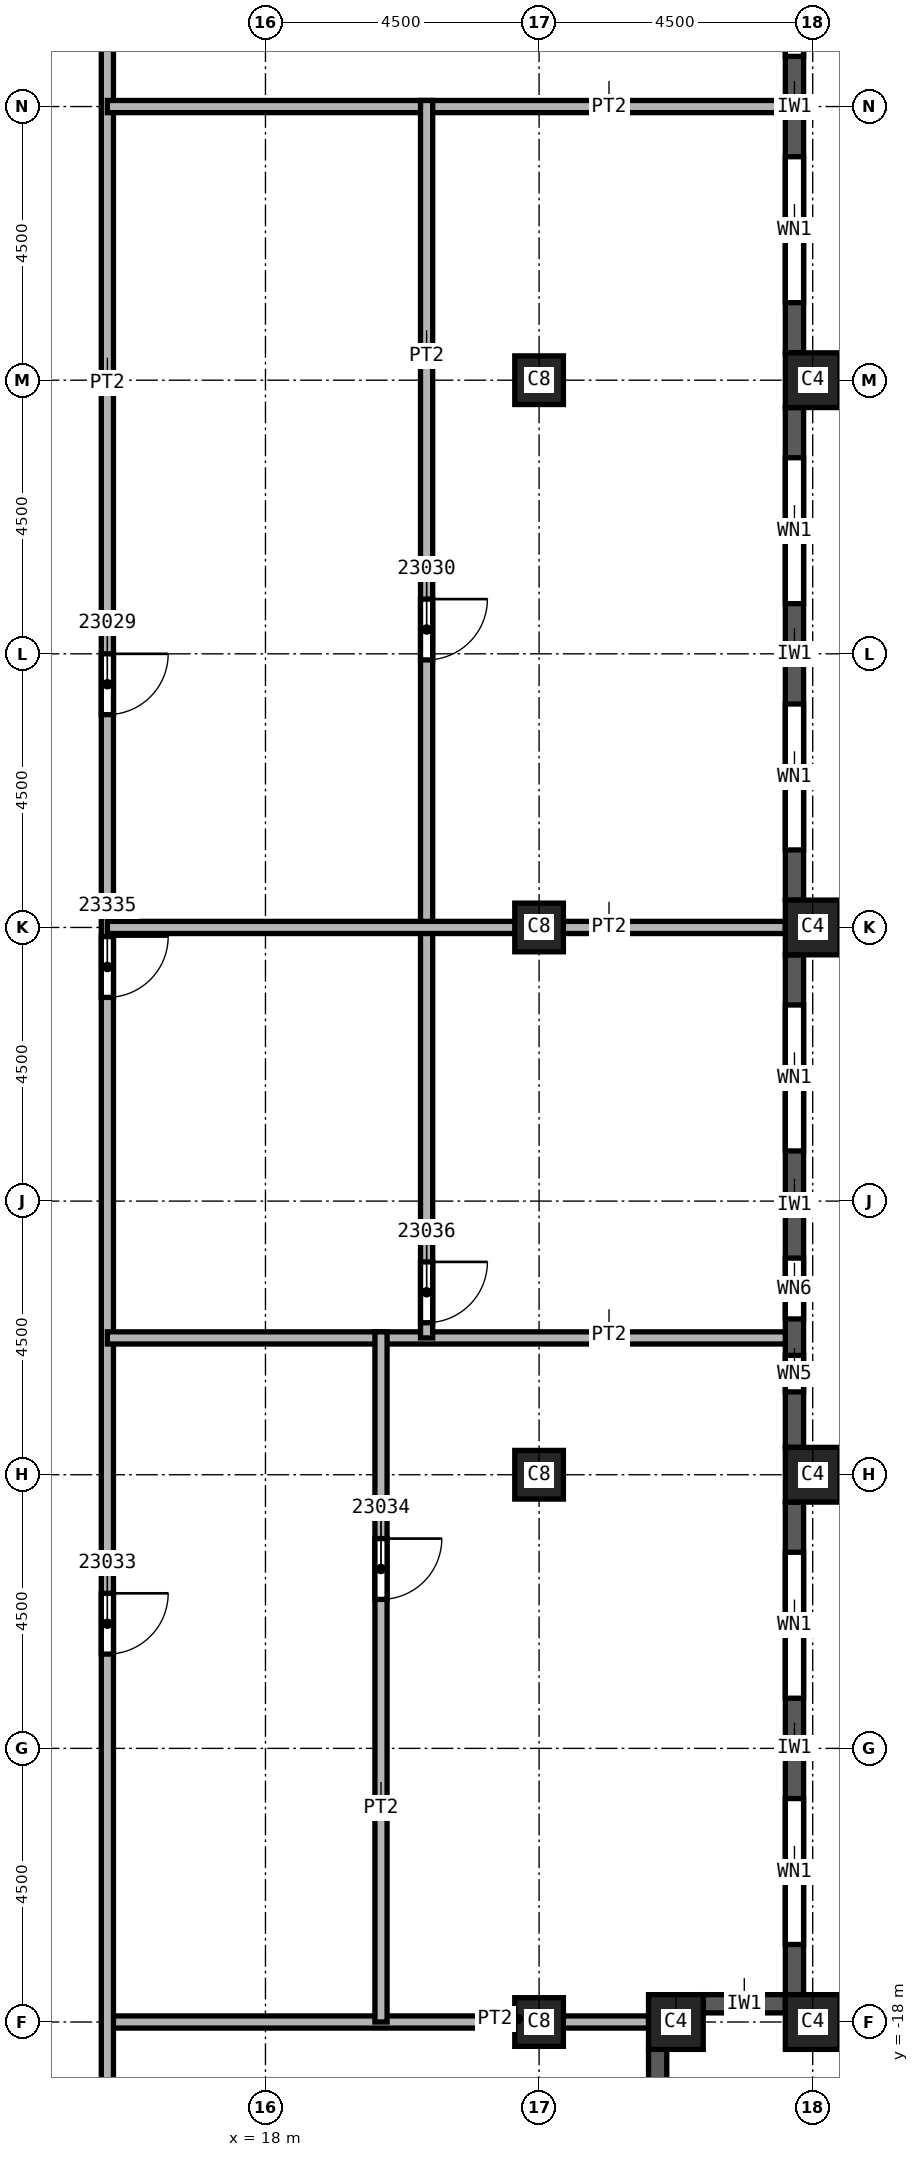
"""IFC4 building model, lengths in metres.
Left out: names, types, materials, properties, quantities, classifications, styles, units other than length and angle.
Written with IfcOpenShell. Run it as: python <this file> out.ifc"""

import sys

from ifc_helpers import new_model, si_unit, direction, frame, frame_2d, origin, origin_2d, place, context, subcontext, project, spatial, rectangle, extrude, element, fill, save


model = new_model("IFC4")
c1 = context("Model", 3, precision=1e-05, world=origin(), true_north=direction((0.0, 1.0)))
c2 = subcontext(c1, "Body", "Model", "MODEL_VIEW")
j1 = project(units=[si_unit("LENGTHUNIT", "METRE"), si_unit("PLANEANGLEUNIT", "RADIAN")], contexts=[c1])
p1 = place(None, origin())
s1 = spatial("IfcSite", under=j1, at=p1, CompositionType="ELEMENT")
p2 = place(p1, origin())
s2 = spatial("IfcBuilding", under=s1, at=p2, CompositionType="ELEMENT")
p3 = place(p2, frame((0.0, 0.0, 330.0)))
s3 = spatial("IfcBuildingStorey", under=s2, at=p3, CompositionType="ELEMENT", Elevation=330.0)
for number, where, z_axis, x_axis in (
    (1, (22.5, 0.0, 0.0), (0.0, 0.0, 1.0), (1.0, 0.0, 0.0)),
    (2, (22.5, 9.0, 0.0), (0.0, 0.0, 1.0), (1.0, 0.0, 0.0)),
    (3, (22.5, -9.0, 0.0), (0.0, 0.0, 1.0), (1.0, 0.0, 0.0)),
    (4, (22.5, -18.0, 0.0), (0.0, 0.0, 1.0), (1.0, 0.0, 0.0)),
):
    element("IfcColumn", number, at=place(p3, frame(where, z_axis=z_axis, x_axis=x_axis)), inside=s3, PredefinedType="COLUMN", context=c2, shape_type="SweptSolid", body=[
        extrude(rectangle(XDim=0.8, YDim=0.8, at=origin_2d()), origin(), (0.0, 0.0, 1.0), 3.74),
    ])
for number, where, z_axis, x_axis in (
    (5, (27.0, 0.0, 0.0), (0.0, 0.0, 1.0), (0.0, 1.0, 0.0)),
    (6, (27.0, 9.0, 0.0), (0.0, 0.0, 1.0), (0.0, 1.0, 0.0)),
    (7, (27.0, -9.0, 0.0), (0.0, 0.0, 1.0), (0.0, 1.0, 0.0)),
    (8, (27.0, -18.0, 0.0), (0.0, 0.0, 1.0), (0.0, 1.0, 0.0)),
    (9, (24.75, -18.0, 0.0), (0.0, 0.0, 1.0), (1.0, 0.0, 0.0)),
):
    element("IfcColumn", number, at=place(p3, frame(where, z_axis=z_axis, x_axis=x_axis)), inside=s3, PredefinedType="COLUMN", context=c2, shape_type="SweptSolid", body=[
        extrude(rectangle(XDim=0.9, YDim=0.9, at=origin_2d()), origin(), (0.0, 0.0, 1.0), 3.74),
    ])
p4 = place(p3, frame((24.45, -21.25, 0.0), z_axis=(0.0, 0.0, 1.0), x_axis=(0.0, 1.0, 0.0)))
e10 = element("IfcWall", 10, at=p4, inside=s3, PredefinedType="SOLIDWALL", context=c2, shape_type="SweptSolid", body=[
    extrude(rectangle(XDim=2.8, YDim=0.3, at=frame_2d((1.4, 0.0))), origin(), (0.0, 0.0, 1.0), 3.14),
])
p5 = place(p3, frame((25.2, -17.7, 0.0), z_axis=(0.0, 0.0, 1.0), x_axis=(1.0, 0.0, 0.0)))
e11 = element("IfcWall", 11, at=p5, inside=s3, PredefinedType="SOLIDWALL", context=c2, shape_type="SweptSolid", body=[
    extrude(rectangle(XDim=1.35, YDim=0.3, at=frame_2d((0.675, 0.0))), origin(), (0.0, 0.0, 1.0), 3.14),
])
p6 = place(p3, frame((26.7, -17.55, 0.0), z_axis=(0.0, 0.0, 1.0), x_axis=(0.0, 1.0, 0.0)))
e12 = element("IfcWall", 12, at=p6, inside=s3, PredefinedType="SOLIDWALL", context=c2, shape_type="SweptSolid", body=[
    extrude(rectangle(XDim=8.1, YDim=0.3, at=frame_2d((4.05, 0.0))), origin(), (0.0, 0.0, 1.0), 3.14),
])
p7 = place(p6, frame((0.825, 0.0, 0.8)))
e13 = element("IfcOpeningElement", 13, at=p7, cuts=e12, PredefinedType="OPENING", context=c2, shape_type="SweptSolid", body=[
    extrude(rectangle(XDim=2.4, YDim=1.95, at=frame_2d((1.2, 0.975))), frame((0.0, 0.15, 0.0), z_axis=(0.0, -1.0, 0.0), x_axis=(1.0, 0.0, 0.0)), (0.0, 0.0, 1.0), 0.3),
])
p8 = place(p6, frame((4.875, 0.0, 0.8)))
e14 = element("IfcOpeningElement", 14, at=p8, cuts=e12, PredefinedType="OPENING", context=c2, shape_type="SweptSolid", body=[
    extrude(rectangle(XDim=2.4, YDim=1.95, at=frame_2d((1.2, 0.975))), frame((0.0, 0.15, 0.0), z_axis=(0.0, -1.0, 0.0), x_axis=(1.0, 0.0, 0.0)), (0.0, 0.0, 1.0), 0.3),
])
p9 = place(p3, frame((26.7, -8.55, 0.0), z_axis=(0.0, 0.0, 1.0), x_axis=(0.0, 1.0, 0.0)))
e15 = element("IfcWall", 15, at=p9, inside=s3, PredefinedType="SOLIDWALL", context=c2, shape_type="SweptSolid", body=[
    extrude(rectangle(XDim=8.1, YDim=0.3, at=frame_2d((4.05, 0.0))), origin(), (0.0, 0.0, 1.0), 3.14),
])
p10 = place(p9, frame((4.875, 0.0, 0.8)))
e16 = element("IfcOpeningElement", 16, at=p10, cuts=e15, PredefinedType="OPENING", context=c2, shape_type="SweptSolid", body=[
    extrude(rectangle(XDim=2.4, YDim=1.95, at=frame_2d((1.2, 0.975))), frame((0.0, 0.15, 0.0), z_axis=(0.0, -1.0, 0.0), x_axis=(1.0, 0.0, 0.0)), (0.0, 0.0, 1.0), 0.3),
])
p11 = place(p9, frame((0.913, 0.0, 0.8)))
e17 = element("IfcOpeningElement", 17, at=p11, cuts=e15, PredefinedType="OPENING", context=c2, shape_type="SweptSolid", body=[
    extrude(rectangle(XDim=0.6, YDim=1.95, at=frame_2d((0.3, 0.975))), frame((0.0, 0.15, 0.0), z_axis=(0.0, -1.0, 0.0), x_axis=(1.0, 0.0, 0.0)), (0.0, 0.0, 1.0), 0.3),
])
p12 = place(p9, frame((2.113, 0.0, 0.8)))
e18 = element("IfcOpeningElement", 18, at=p12, cuts=e15, PredefinedType="OPENING", context=c2, shape_type="SweptSolid", body=[
    extrude(rectangle(XDim=1.0, YDim=1.95, at=frame_2d((0.5, 0.975))), frame((0.0, 0.15, 0.0), z_axis=(0.0, -1.0, 0.0), x_axis=(1.0, 0.0, 0.0)), (0.0, 0.0, 1.0), 0.3),
])
p13 = place(p3, frame((26.7, 0.45, 0.0), z_axis=(0.0, 0.0, 1.0), x_axis=(0.0, 1.0, 0.0)))
e19 = element("IfcWall", 19, at=p13, inside=s3, PredefinedType="SOLIDWALL", context=c2, shape_type="SweptSolid", body=[
    extrude(rectangle(XDim=8.1, YDim=0.3, at=frame_2d((4.05, 0.0))), origin(), (0.0, 0.0, 1.0), 3.14),
])
p14 = place(p13, frame((0.825, 0.0, 0.8)))
e20 = element("IfcOpeningElement", 20, at=p14, cuts=e19, PredefinedType="OPENING", context=c2, shape_type="SweptSolid", body=[
    extrude(rectangle(XDim=2.4, YDim=1.95, at=frame_2d((1.2, 0.975))), frame((0.0, 0.15, 0.0), z_axis=(0.0, -1.0, 0.0), x_axis=(1.0, 0.0, 0.0)), (0.0, 0.0, 1.0), 0.3),
])
p15 = place(p13, frame((4.875, 0.0, 0.8)))
e21 = element("IfcOpeningElement", 21, at=p15, cuts=e19, PredefinedType="OPENING", context=c2, shape_type="SweptSolid", body=[
    extrude(rectangle(XDim=2.4, YDim=1.95, at=frame_2d((1.2, 0.975))), frame((0.0, 0.15, 0.0), z_axis=(0.0, -1.0, 0.0), x_axis=(1.0, 0.0, 0.0)), (0.0, 0.0, 1.0), 0.3),
])
p16 = place(p3, frame((26.7, 9.45, 0.0), z_axis=(0.0, 0.0, 1.0), x_axis=(0.0, 1.0, 0.0)))
e22 = element("IfcWall", 22, at=p16, inside=s3, PredefinedType="SOLIDWALL", context=c2, shape_type="SweptSolid", body=[
    extrude(rectangle(XDim=8.1, YDim=0.3, at=frame_2d((4.05, 0.0))), origin(), (0.0, 0.0, 1.0), 3.14),
])
p17 = place(p16, frame((0.825, 0.0, 0.8)))
e23 = element("IfcOpeningElement", 23, at=p17, cuts=e22, PredefinedType="OPENING", context=c2, shape_type="SweptSolid", body=[
    extrude(rectangle(XDim=2.4, YDim=1.95, at=frame_2d((1.2, 0.975))), frame((0.0, 0.15, 0.0), z_axis=(0.0, -1.0, 0.0), x_axis=(1.0, 0.0, 0.0)), (0.0, 0.0, 1.0), 0.3),
])
p18 = place(p16, frame((4.875, 0.0, 0.8)))
e24 = element("IfcOpeningElement", 24, at=p18, cuts=e22, PredefinedType="OPENING", context=c2, shape_type="SweptSolid", body=[
    extrude(rectangle(XDim=2.4, YDim=1.95, at=frame_2d((1.2, 0.975))), frame((0.0, 0.15, 0.0), z_axis=(0.0, -1.0, 0.0), x_axis=(1.0, 0.0, 0.0)), (0.0, 0.0, 1.0), 0.3),
])
p19 = place(p3, frame((15.4, -18.0, 0.0), z_axis=(0.0, 0.0, 1.0), x_axis=(1.0, 0.0, 0.0)))
e25 = element("IfcWall", 25, at=p19, inside=s3, PredefinedType="PARTITIONING", context=c2, shape_type="SweptSolid", body=[
    extrude(rectangle(XDim=8.9, YDim=0.2, at=frame_2d((4.45, 0.0))), origin(), (0.0, 0.0, 1.0), 3.74),
])
p20 = place(p3, frame((15.4, 24.95, 0.0), z_axis=(0.0, 0.0, 1.0), x_axis=(0.0, -1.0, 0.0)))
e26 = element("IfcWall", 26, at=p20, inside=s3, PredefinedType="PARTITIONING", context=c2, shape_type="SweptSolid", body=[
    extrude(rectangle(XDim=49.9, YDim=0.2, at=frame_2d((24.95, 0.0))), origin(), (0.0, 0.0, 1.0), 3.74),
])
p21 = place(p20, frame((20.45, 0.0, 0.0)))
e27 = element("IfcOpeningElement", 27, at=p21, cuts=e26, PredefinedType="OPENING", context=c2, shape_type="SweptSolid", body=[
    extrude(rectangle(XDim=1.0, YDim=2.1, at=frame_2d((0.5, 1.05))), frame((0.0, 0.1, 0.0), z_axis=(0.0, -1.0, 0.0), x_axis=(1.0, 0.0, 0.0)), (0.0, 0.0, 1.0), 0.2),
])
p22 = place(p20, frame((5.05, 0.0, 0.0)))
e28 = element("IfcOpeningElement", 28, at=p22, cuts=e26, PredefinedType="OPENING", context=c2, shape_type="SweptSolid", body=[
    extrude(rectangle(XDim=1.0, YDim=2.1, at=frame_2d((0.5, 1.05))), frame((0.0, 0.1, 0.0), z_axis=(0.0, -1.0, 0.0), x_axis=(1.0, 0.0, 0.0)), (0.0, 0.0, 1.0), 0.2),
])
p23 = place(p20, frame((45.95, 0.0, 0.0)))
e29 = element("IfcOpeningElement", 29, at=p23, cuts=e26, PredefinedType="OPENING", context=c2, shape_type="SweptSolid", body=[
    extrude(rectangle(XDim=1.0, YDim=2.1, at=frame_2d((0.5, 1.05))), frame((0.0, 0.1, 0.0), z_axis=(0.0, -1.0, 0.0), x_axis=(1.0, 0.0, 0.0)), (0.0, 0.0, 1.0), 0.2),
])
p24 = place(p20, frame((35.9, 0.0, 0.0)))
e30 = element("IfcOpeningElement", 30, at=p24, cuts=e26, PredefinedType="OPENING", context=c2, shape_type="SweptSolid", body=[
    extrude(rectangle(XDim=1.0, YDim=2.1, at=frame_2d((0.5, 1.05))), frame((0.0, 0.1, 0.0), z_axis=(0.0, -1.0, 0.0), x_axis=(1.0, 0.0, 0.0)), (0.0, 0.0, 1.0), 0.2),
])
p25 = place(p20, frame((25.1, 0.0, 0.0)))
e31 = element("IfcOpeningElement", 31, at=p25, cuts=e26, PredefinedType="OPENING", context=c2, shape_type="SweptSolid", body=[
    extrude(rectangle(XDim=1.0, YDim=2.1, at=frame_2d((0.5, 1.05))), frame((0.0, 0.1, 0.0), z_axis=(0.0, -1.0, 0.0), x_axis=(1.0, 0.0, 0.0)), (0.0, 0.0, 1.0), 0.2),
])
for number, where, z_axis, x_axis in (
    (32, (15.4, -6.75, 0.0), (0.0, 0.0, 1.0), (1.0, 0.0, 0.0)),
    (33, (15.4, 13.5, 0.0), (0.0, 0.0, 1.0), (1.0, 0.0, 0.0)),
):
    element("IfcWall", number, at=place(p3, frame(where, z_axis=z_axis, x_axis=x_axis)), inside=s3, PredefinedType="PARTITIONING", context=c2, shape_type="SweptSolid", body=[
        extrude(rectangle(XDim=11.15, YDim=0.2, at=frame_2d((5.575, 0.0))), origin(), (0.0, 0.0, 1.0), 3.74),
    ])
p26 = place(p3, frame((19.9, -6.65, 0.0), z_axis=(0.0, 0.0, 1.0), x_axis=(0.0, -1.0, 0.0)))
e34 = element("IfcWall", 34, at=p26, inside=s3, PredefinedType="PARTITIONING", context=c2, shape_type="SweptSolid", body=[
    extrude(rectangle(XDim=11.35, YDim=0.2, at=frame_2d((5.675, 0.0))), origin(), (0.0, 0.0, 1.0), 3.74),
])
p27 = place(p26, frame((3.4, 0.0, 0.0)))
e35 = element("IfcOpeningElement", 35, at=p27, cuts=e34, PredefinedType="OPENING", context=c2, shape_type="SweptSolid", body=[
    extrude(rectangle(XDim=1.0, YDim=2.1, at=frame_2d((0.5, 1.05))), frame((0.0, 0.1, 0.0), z_axis=(0.0, -1.0, 0.0), x_axis=(1.0, 0.0, 0.0)), (0.0, 0.0, 1.0), 0.2),
])
p28 = place(p3, frame((20.65, 13.6, 0.0), z_axis=(0.0, 0.0, 1.0), x_axis=(0.0, -1.0, 0.0)))
e36 = element("IfcWall", 36, at=p28, inside=s3, PredefinedType="PARTITIONING", context=c2, shape_type="SweptSolid", body=[
    extrude(rectangle(XDim=20.35, YDim=0.2, at=frame_2d((10.175, 0.0))), origin(), (0.0, 0.0, 1.0), 3.74),
])
p29 = place(p28, frame((8.2, 0.0, 0.0)))
e37 = element("IfcOpeningElement", 37, at=p29, cuts=e36, PredefinedType="OPENING", context=c2, shape_type="SweptSolid", body=[
    extrude(rectangle(XDim=1.0, YDim=2.1, at=frame_2d((0.5, 1.05))), frame((0.0, 0.1, 0.0), z_axis=(0.0, -1.0, 0.0), x_axis=(1.0, 0.0, 0.0)), (0.0, 0.0, 1.0), 0.2),
])
p30 = place(p28, frame((19.1, 0.0, 0.0)))
e38 = element("IfcOpeningElement", 38, at=p30, cuts=e36, PredefinedType="OPENING", context=c2, shape_type="SweptSolid", body=[
    extrude(rectangle(XDim=1.0, YDim=2.1, at=frame_2d((0.5, 1.05))), frame((0.0, 0.1, 0.0), z_axis=(0.0, -1.0, 0.0), x_axis=(1.0, 0.0, 0.0)), (0.0, 0.0, 1.0), 0.2),
])
p31 = place(p3, frame((26.55, 0.0, 0.0), z_axis=(0.0, 0.0, 1.0), x_axis=(-1.0, 0.0, 0.0)))
e39 = element("IfcWall", 39, at=p31, inside=s3, PredefinedType="PARTITIONING", context=c2, shape_type="SweptSolid", body=[
    extrude(rectangle(XDim=11.15, YDim=0.2, at=frame_2d((5.575, 0.0))), origin(), (0.0, 0.0, 1.0), 3.74),
])
p32 = place(p7, origin())
e40 = element("IfcWindow", 40, at=p32, inside=s3, PartitioningType="SINGLE_PANEL", PredefinedType="WINDOW", context=c2, shape_type="SweptSolid", body=[
    extrude(rectangle(XDim=2.4, YDim=1.95, at=frame_2d((1.2, 0.975))), frame((0.0, 0.03, 0.0), z_axis=(0.0, -1.0, 0.0), x_axis=(1.0, 0.0, 0.0)), (0.0, 0.0, 1.0), 0.06),
])
fill(e13, e40)
p33 = place(p8, origin())
e41 = element("IfcWindow", 41, at=p33, inside=s3, PartitioningType="SINGLE_PANEL", PredefinedType="WINDOW", context=c2, shape_type="SweptSolid", body=[
    extrude(rectangle(XDim=2.4, YDim=1.95, at=frame_2d((1.2, 0.975))), frame((0.0, 0.03, 0.0), z_axis=(0.0, -1.0, 0.0), x_axis=(1.0, 0.0, 0.0)), (0.0, 0.0, 1.0), 0.06),
])
fill(e14, e41)
p34 = place(p10, origin())
e42 = element("IfcWindow", 42, at=p34, inside=s3, PartitioningType="SINGLE_PANEL", PredefinedType="WINDOW", context=c2, shape_type="SweptSolid", body=[
    extrude(rectangle(XDim=2.4, YDim=1.95, at=frame_2d((1.2, 0.975))), frame((0.0, 0.03, 0.0), z_axis=(0.0, -1.0, 0.0), x_axis=(1.0, 0.0, 0.0)), (0.0, 0.0, 1.0), 0.06),
])
fill(e16, e42)
p35 = place(p14, origin())
e43 = element("IfcWindow", 43, at=p35, inside=s3, PartitioningType="SINGLE_PANEL", PredefinedType="WINDOW", context=c2, shape_type="SweptSolid", body=[
    extrude(rectangle(XDim=2.4, YDim=1.95, at=frame_2d((1.2, 0.975))), frame((0.0, 0.03, 0.0), z_axis=(0.0, -1.0, 0.0), x_axis=(1.0, 0.0, 0.0)), (0.0, 0.0, 1.0), 0.06),
])
fill(e20, e43)
p36 = place(p15, origin())
e44 = element("IfcWindow", 44, at=p36, inside=s3, PartitioningType="SINGLE_PANEL", PredefinedType="WINDOW", context=c2, shape_type="SweptSolid", body=[
    extrude(rectangle(XDim=2.4, YDim=1.95, at=frame_2d((1.2, 0.975))), frame((0.0, 0.03, 0.0), z_axis=(0.0, -1.0, 0.0), x_axis=(1.0, 0.0, 0.0)), (0.0, 0.0, 1.0), 0.06),
])
fill(e21, e44)
p37 = place(p17, origin())
e45 = element("IfcWindow", 45, at=p37, inside=s3, PartitioningType="SINGLE_PANEL", PredefinedType="WINDOW", context=c2, shape_type="SweptSolid", body=[
    extrude(rectangle(XDim=2.4, YDim=1.95, at=frame_2d((1.2, 0.975))), frame((0.0, 0.03, 0.0), z_axis=(0.0, -1.0, 0.0), x_axis=(1.0, 0.0, 0.0)), (0.0, 0.0, 1.0), 0.06),
])
fill(e23, e45)
p38 = place(p18, origin())
e46 = element("IfcWindow", 46, at=p38, inside=s3, PartitioningType="SINGLE_PANEL", PredefinedType="WINDOW", context=c2, shape_type="SweptSolid", body=[
    extrude(rectangle(XDim=2.4, YDim=1.95, at=frame_2d((1.2, 0.975))), frame((0.0, 0.03, 0.0), z_axis=(0.0, -1.0, 0.0), x_axis=(1.0, 0.0, 0.0)), (0.0, 0.0, 1.0), 0.06),
])
fill(e24, e46)
p39 = place(p21, origin())
e47 = element("IfcDoor", 47, at=p39, inside=s3, OperationType="SINGLE_SWING_RIGHT", PredefinedType="DOOR", context=c2, shape_type="SweptSolid", body=[
    extrude(rectangle(XDim=1.0, YDim=2.1, at=frame_2d((0.5, 1.05))), frame((0.0, 0.025, 0.0), z_axis=(0.0, -1.0, 0.0), x_axis=(1.0, 0.0, 0.0)), (0.0, 0.0, 1.0), 0.05),
])
fill(e27, e47)
p40 = place(p29, origin())
e48 = element("IfcDoor", 48, at=p40, inside=s3, OperationType="SINGLE_SWING_LEFT", PredefinedType="DOOR", context=c2, shape_type="SweptSolid", body=[
    extrude(rectangle(XDim=1.0, YDim=2.1, at=frame_2d((0.5, 1.05))), frame((0.0, 0.025, 0.0), z_axis=(0.0, -1.0, 0.0), x_axis=(1.0, 0.0, 0.0)), (0.0, 0.0, 1.0), 0.05),
])
fill(e37, e48)
p41 = place(p24, origin())
e49 = element("IfcDoor", 49, at=p41, inside=s3, OperationType="SINGLE_SWING_RIGHT", PredefinedType="DOOR", context=c2, shape_type="SweptSolid", body=[
    extrude(rectangle(XDim=1.0, YDim=2.1, at=frame_2d((0.5, 1.05))), frame((0.0, 0.025, 0.0), z_axis=(0.0, -1.0, 0.0), x_axis=(1.0, 0.0, 0.0)), (0.0, 0.0, 1.0), 0.05),
])
fill(e30, e49)
p42 = place(p27, origin())
e50 = element("IfcDoor", 50, at=p42, inside=s3, OperationType="SINGLE_SWING_LEFT", PredefinedType="DOOR", context=c2, shape_type="SweptSolid", body=[
    extrude(rectangle(XDim=1.0, YDim=2.1, at=frame_2d((0.5, 1.05))), frame((0.0, 0.025, 0.0), z_axis=(0.0, -1.0, 0.0), x_axis=(1.0, 0.0, 0.0)), (0.0, 0.0, 1.0), 0.05),
])
fill(e35, e50)
p43 = place(p25, origin())
e51 = element("IfcDoor", 51, at=p43, inside=s3, OperationType="SINGLE_SWING_RIGHT", PredefinedType="DOOR", context=c2, shape_type="SweptSolid", body=[
    extrude(rectangle(XDim=1.0, YDim=2.1, at=frame_2d((0.5, 1.05))), frame((0.0, 0.025, 0.0), z_axis=(0.0, -1.0, 0.0), x_axis=(1.0, 0.0, 0.0)), (0.0, 0.0, 1.0), 0.05),
])
fill(e31, e51)
p44 = place(p30, origin())
e52 = element("IfcDoor", 52, at=p44, inside=s3, OperationType="SINGLE_SWING_LEFT", PredefinedType="DOOR", context=c2, shape_type="SweptSolid", body=[
    extrude(rectangle(XDim=1.0, YDim=2.1, at=frame_2d((0.5, 1.05))), frame((0.0, 0.025, 0.0), z_axis=(0.0, -1.0, 0.0), x_axis=(1.0, 0.0, 0.0)), (0.0, 0.0, 1.0), 0.05),
])
fill(e38, e52)
p45 = place(p11, origin())
e53 = element("IfcWindow", 53, at=p45, inside=s3, PartitioningType="SINGLE_PANEL", PredefinedType="WINDOW", context=c2, shape_type="SweptSolid", body=[
    extrude(rectangle(XDim=0.6, YDim=1.95, at=frame_2d((0.3, 0.975))), frame((0.0, 0.03, 0.0), z_axis=(0.0, -1.0, 0.0), x_axis=(1.0, 0.0, 0.0)), (0.0, 0.0, 1.0), 0.06),
])
fill(e17, e53)
p46 = place(p12, origin())
e54 = element("IfcWindow", 54, at=p46, inside=s3, PartitioningType="SINGLE_PANEL", PredefinedType="WINDOW", context=c2, shape_type="SweptSolid", body=[
    extrude(rectangle(XDim=1.0, YDim=1.95, at=frame_2d((0.5, 0.975))), frame((0.0, 0.03, 0.0), z_axis=(0.0, -1.0, 0.0), x_axis=(1.0, 0.0, 0.0)), (0.0, 0.0, 1.0), 0.06),
])
fill(e18, e54)
save(model, sys.argv[1])
